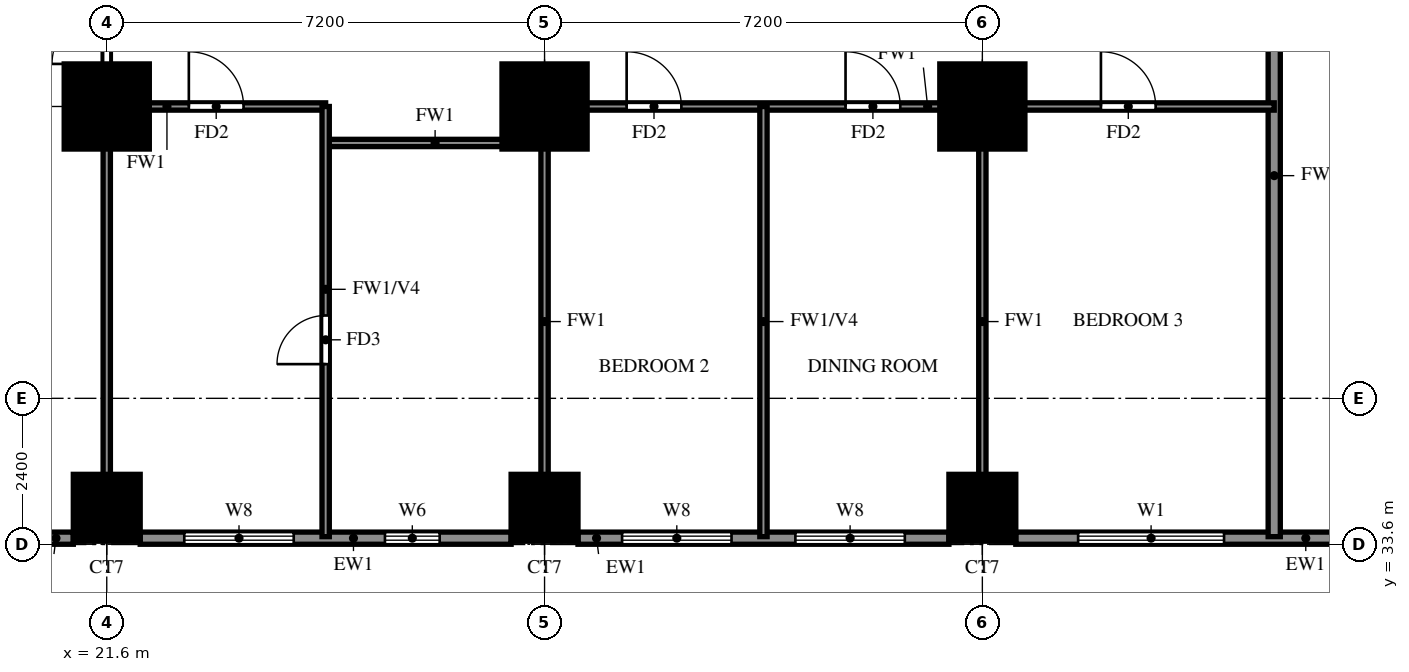
"""IFC4 building model, lengths in metres.
Left out: names, types, materials, properties, quantities, classifications, styles, units other than length and angle.
Written with IfcOpenShell. Run it as: python <this file> out.ifc"""

import sys

from ifc_helpers import new_model, si_unit, direction, frame, frame_2d, origin, origin_2d, place, context, subcontext, project, spatial, rectangle, extrude, source, transform, mapped, element, fill, save


model = new_model("IFC4")
c1 = context("Model", 3, precision=1e-05, world=origin(), true_north=direction((0.0, 1.0)))
c2 = subcontext(c1, "Body", "Model", "MODEL_VIEW")
j1 = project(units=[si_unit("LENGTHUNIT", "METRE"), si_unit("PLANEANGLEUNIT", "RADIAN")], contexts=[c1])
p1 = place(None, origin())
s1 = spatial("IfcSite", under=j1, at=p1, CompositionType="ELEMENT")
p2 = place(p1, origin())
s2 = spatial("IfcBuilding", under=s1, at=p2, CompositionType="ELEMENT")
p3 = place(p2, frame((0.0, 0.0, 48.0)))
s3 = spatial("IfcBuildingStorey", under=s2, at=p3, CompositionType="ELEMENT", Elevation=48.0)
m1 = source(origin(), c2, "Body", "SweptSolid", [
    extrude(rectangle(XDim=1.1, YDim=1.1, at=origin_2d()), origin(), (0.0, 0.0, 1.0), 3.18),
])
for number, where, z_axis, x_axis in (
    (1, (21.6, 34.2, 0.0), (0.0, 0.0, 1.0), (1.0, 0.0, 0.0)),
    (2, (28.8, 34.2, 0.0), (0.0, 0.0, 1.0), (1.0, 0.0, 0.0)),
    (3, (36.0, 34.2, 0.0), (0.0, 0.0, 1.0), (1.0, 0.0, 0.0)),
):
    element("IfcColumn", number, at=place(p3, frame(where, z_axis=z_axis, x_axis=x_axis)), inside=s3, PredefinedType="COLUMN", context=c2, shape_type="MappedRepresentation", body=[
        mapped(m1, transform((0.0, 0.0, 0.0))),
    ])
m2 = source(origin(), c2, "Body", "SweptSolid", [
    extrude(rectangle(XDim=1.4, YDim=1.4, at=origin_2d()), origin(), (0.0, 0.0, 1.0), 3.18),
])
for number, where, z_axis, x_axis in (
    (4, (21.6, 40.8, 0.0), (0.0, 0.0, 1.0), (1.0, 0.0, 0.0)),
    (5, (28.8, 40.8, 0.0), (0.0, 0.0, 1.0), (1.0, 0.0, 0.0)),
    (6, (36.0, 40.8, 0.0), (0.0, 0.0, 1.0), (1.0, 0.0, 0.0)),
):
    element("IfcColumn", number, at=place(p3, frame(where, z_axis=z_axis, x_axis=x_axis)), inside=s3, PredefinedType="COLUMN", context=c2, shape_type="MappedRepresentation", body=[
        mapped(m2, transform((0.0, 0.0, 0.0))),
    ])
p4 = place(p3, frame((18.2, 33.7, 0.0), z_axis=(0.0, 0.0, 1.0), x_axis=(1.0, 0.0, 0.0)))
e7 = element("IfcWall", 7, at=p4, inside=s3, PredefinedType="SOLIDWALL", context=c2, shape_type="SweptSolid", body=[
    extrude(rectangle(XDim=2.85, YDim=0.2, at=frame_2d((1.425, 0.0))), origin(), (0.0, 0.0, 1.0), 3.18),
])
p5 = place(p4, frame((0.525, 0.0, 0.6)))
e8 = element("IfcOpeningElement", 8, at=p5, cuts=e7, PredefinedType="OPENING", context=c2, shape_type="SweptSolid", body=[
    extrude(rectangle(XDim=1.8, YDim=2.4, at=frame_2d((0.9, 1.2))), frame((0.0, 0.11, 0.0), z_axis=(0.0, -1.0, 0.0), x_axis=(1.0, 0.0, 0.0)), (0.0, 0.0, 1.0), 0.22),
])
p6 = place(p3, frame((22.15, 33.7, 0.0), z_axis=(0.0, 0.0, 1.0), x_axis=(1.0, 0.0, 0.0)))
e9 = element("IfcWall", 9, at=p6, inside=s3, PredefinedType="SOLIDWALL", context=c2, shape_type="SweptSolid", body=[
    extrude(rectangle(XDim=6.1, YDim=0.2, at=frame_2d((3.05, 0.0))), origin(), (0.0, 0.0, 1.0), 3.18),
])
p7 = place(p6, frame((0.725, 0.0, 0.6)))
e10 = element("IfcOpeningElement", 10, at=p7, cuts=e9, PredefinedType="OPENING", context=c2, shape_type="SweptSolid", body=[
    extrude(rectangle(XDim=1.8, YDim=2.4, at=frame_2d((0.9, 1.2))), frame((0.0, 0.11, 0.0), z_axis=(0.0, -1.0, 0.0), x_axis=(1.0, 0.0, 0.0)), (0.0, 0.0, 1.0), 0.22),
])
p8 = place(p6, frame((4.025, 0.0, 1.5)))
e11 = element("IfcOpeningElement", 11, at=p8, cuts=e9, PredefinedType="OPENING", context=c2, shape_type="SweptSolid", body=[
    extrude(rectangle(XDim=0.9, YDim=0.9, at=frame_2d((0.45, 0.45))), frame((0.0, 0.11, 0.0), z_axis=(0.0, -1.0, 0.0), x_axis=(1.0, 0.0, 0.0)), (0.0, 0.0, 1.0), 0.22),
])
p9 = place(p3, frame((29.35, 33.7, 0.0), z_axis=(0.0, 0.0, 1.0), x_axis=(1.0, 0.0, 0.0)))
e12 = element("IfcWall", 12, at=p9, inside=s3, PredefinedType="SOLIDWALL", context=c2, shape_type="SweptSolid", body=[
    extrude(rectangle(XDim=6.1, YDim=0.2, at=frame_2d((3.05, 0.0))), origin(), (0.0, 0.0, 1.0), 3.18),
])
p10 = place(p9, frame((0.725, 0.0, 0.6)))
e13 = element("IfcOpeningElement", 13, at=p10, cuts=e12, PredefinedType="OPENING", context=c2, shape_type="SweptSolid", body=[
    extrude(rectangle(XDim=1.8, YDim=2.4, at=frame_2d((0.9, 1.2))), frame((0.0, 0.11, 0.0), z_axis=(0.0, -1.0, 0.0), x_axis=(1.0, 0.0, 0.0)), (0.0, 0.0, 1.0), 0.22),
])
p11 = place(p9, frame((3.575, 0.0, 0.6)))
e14 = element("IfcOpeningElement", 14, at=p11, cuts=e12, PredefinedType="OPENING", context=c2, shape_type="SweptSolid", body=[
    extrude(rectangle(XDim=1.8, YDim=2.4, at=frame_2d((0.9, 1.2))), frame((0.0, 0.11, 0.0), z_axis=(0.0, -1.0, 0.0), x_axis=(1.0, 0.0, 0.0)), (0.0, 0.0, 1.0), 0.22),
])
p12 = place(p3, frame((36.55, 33.7, 0.0), z_axis=(0.0, 0.0, 1.0), x_axis=(1.0, 0.0, 0.0)))
e15 = element("IfcWall", 15, at=p12, inside=s3, PredefinedType="SOLIDWALL", context=c2, shape_type="SweptSolid", body=[
    extrude(rectangle(XDim=5.45, YDim=0.2, at=frame_2d((2.725, 0.0))), origin(), (0.0, 0.0, 1.0), 3.18),
])
p13 = place(p12, frame((1.025, 0.0, 0.6)))
e16 = element("IfcOpeningElement", 16, at=p13, cuts=e15, PredefinedType="OPENING", context=c2, shape_type="SweptSolid", body=[
    extrude(rectangle(XDim=2.4, YDim=2.4, at=frame_2d((1.2, 1.2))), frame((0.0, 0.11, 0.0), z_axis=(0.0, -1.0, 0.0), x_axis=(1.0, 0.0, 0.0)), (0.0, 0.0, 1.0), 0.22),
])
p14 = place(p3, frame((40.8, 33.725, 0.0), z_axis=(0.0, 0.0, 1.0), x_axis=(0.0, 1.0, 0.0)))
e17 = element("IfcWall", 17, at=p14, inside=s3, PredefinedType="SOLIDWALL", context=c2, shape_type="SweptSolid", body=[
    extrude(rectangle(XDim=11.875, YDim=0.2, at=frame_2d((5.938, 0.0))), origin(), (0.0, 0.0, 1.0), 2.28),
])
p15 = place(p3, frame((25.2, 40.2, 0.0), z_axis=(0.0, 0.0, 1.0), x_axis=(1.0, 0.0, 0.0)))
e18 = element("IfcWall", 18, at=p15, inside=s3, PredefinedType="PARTITIONING", context=c2, shape_type="SweptSolid", body=[
    extrude(rectangle(XDim=3.6, YDim=0.12, at=frame_2d((1.8, 0.0))), origin(), (0.0, 0.0, 1.0), 3.18),
])
p16 = place(p3, frame((21.6, 40.8, 0.0), z_axis=(0.0, 0.0, 1.0), x_axis=(1.0, 0.0, 0.0)))
e19 = element("IfcWall", 19, at=p16, inside=s3, PredefinedType="PARTITIONING", context=c2, shape_type="SweptSolid", body=[
    extrude(rectangle(XDim=3.6, YDim=0.12, at=frame_2d((1.8, 0.0))), origin(), (0.0, 0.0, 1.0), 3.18),
])
p17 = place(p16, frame((1.35, 0.0, 0.0)))
e20 = element("IfcOpeningElement", 20, at=p17, cuts=e19, PredefinedType="OPENING", context=c2, shape_type="SweptSolid", body=[
    extrude(rectangle(XDim=0.9, YDim=2.1, at=frame_2d((0.45, 1.05))), frame((0.0, 0.07, 0.0), z_axis=(0.0, -1.0, 0.0), x_axis=(1.0, 0.0, 0.0)), (0.0, 0.0, 1.0), 0.14),
])
p18 = place(p3, frame((28.8, 40.8, 0.0), z_axis=(0.0, 0.0, 1.0), x_axis=(1.0, 0.0, 0.0)))
e21 = element("IfcWall", 21, at=p18, inside=s3, PredefinedType="PARTITIONING", context=c2, shape_type="SweptSolid", body=[
    extrude(rectangle(XDim=12.0, YDim=0.12, at=frame_2d((6.0, 0.0))), origin(), (0.0, 0.0, 1.0), 3.18),
])
p19 = place(p18, frame((1.35, 0.0, 0.0)))
e22 = element("IfcOpeningElement", 22, at=p19, cuts=e21, PredefinedType="OPENING", context=c2, shape_type="SweptSolid", body=[
    extrude(rectangle(XDim=0.9, YDim=2.1, at=frame_2d((0.45, 1.05))), frame((0.0, 0.07, 0.0), z_axis=(0.0, -1.0, 0.0), x_axis=(1.0, 0.0, 0.0)), (0.0, 0.0, 1.0), 0.14),
])
p20 = place(p18, frame((4.95, 0.0, 0.0)))
e23 = element("IfcOpeningElement", 23, at=p20, cuts=e21, PredefinedType="OPENING", context=c2, shape_type="SweptSolid", body=[
    extrude(rectangle(XDim=0.9, YDim=2.1, at=frame_2d((0.45, 1.05))), frame((0.0, 0.07, 0.0), z_axis=(0.0, -1.0, 0.0), x_axis=(1.0, 0.0, 0.0)), (0.0, 0.0, 1.0), 0.14),
])
p21 = place(p18, frame((9.15, 0.0, 0.0)))
e24 = element("IfcOpeningElement", 24, at=p21, cuts=e21, PredefinedType="OPENING", context=c2, shape_type="SweptSolid", body=[
    extrude(rectangle(XDim=0.9, YDim=2.1, at=frame_2d((0.45, 1.05))), frame((0.0, 0.07, 0.0), z_axis=(0.0, -1.0, 0.0), x_axis=(1.0, 0.0, 0.0)), (0.0, 0.0, 1.0), 0.14),
])
p22 = place(p3, frame((21.6, 33.725, 0.0), z_axis=(0.0, 0.0, 1.0), x_axis=(0.0, 1.0, 0.0)))
e25 = element("IfcWall", 25, at=p22, inside=s3, PredefinedType="PARTITIONING", context=c2, shape_type="SweptSolid", body=[
    extrude(rectangle(XDim=35.875, YDim=0.12, at=frame_2d((17.938, 0.0))), origin(), (0.0, 0.0, 1.0), 3.18),
])
p23 = place(p22, frame((7.775, 0.0, 0.0)))
e26 = element("IfcOpeningElement", 26, at=p23, cuts=e25, PredefinedType="OPENING", context=c2, shape_type="SweptSolid", body=[
    extrude(rectangle(XDim=0.9, YDim=2.1, at=frame_2d((0.45, 1.05))), frame((0.0, 0.07, 0.0), z_axis=(0.0, -1.0, 0.0), x_axis=(1.0, 0.0, 0.0)), (0.0, 0.0, 1.0), 0.14),
])
p24 = place(p22, frame((15.625, 0.0, 0.0)))
e27 = element("IfcOpeningElement", 27, at=p24, cuts=e25, PredefinedType="OPENING", context=c2, shape_type="SweptSolid", body=[
    extrude(rectangle(XDim=0.9, YDim=2.1, at=frame_2d((0.45, 1.05))), frame((0.0, 0.07, 0.0), z_axis=(0.0, -1.0, 0.0), x_axis=(1.0, 0.0, 0.0)), (0.0, 0.0, 1.0), 0.14),
])
p25 = place(p22, frame((22.225, 0.0, 0.0)))
e28 = element("IfcOpeningElement", 28, at=p25, cuts=e25, PredefinedType="OPENING", context=c2, shape_type="SweptSolid", body=[
    extrude(rectangle(XDim=1.5, YDim=2.1, at=frame_2d((0.75, 1.05))), frame((0.0, 0.07, 0.0), z_axis=(0.0, -1.0, 0.0), x_axis=(1.0, 0.0, 0.0)), (0.0, 0.0, 1.0), 0.14),
])
p26 = place(p22, frame((26.425, 0.0, 0.0)))
e29 = element("IfcOpeningElement", 29, at=p26, cuts=e25, PredefinedType="OPENING", context=c2, shape_type="SweptSolid", body=[
    extrude(rectangle(XDim=0.9, YDim=2.1, at=frame_2d((0.45, 1.05))), frame((0.0, 0.07, 0.0), z_axis=(0.0, -1.0, 0.0), x_axis=(1.0, 0.0, 0.0)), (0.0, 0.0, 1.0), 0.14),
])
p27 = place(p22, frame((31.825, 0.0, 0.0)))
e30 = element("IfcOpeningElement", 30, at=p27, cuts=e25, PredefinedType="OPENING", context=c2, shape_type="SweptSolid", body=[
    extrude(rectangle(XDim=0.9, YDim=2.1, at=frame_2d((0.45, 1.05))), frame((0.0, 0.07, 0.0), z_axis=(0.0, -1.0, 0.0), x_axis=(1.0, 0.0, 0.0)), (0.0, 0.0, 1.0), 0.14),
])
p28 = place(p3, frame((25.2, 33.725, 0.0), z_axis=(0.0, 0.0, 1.0), x_axis=(0.0, 1.0, 0.0)))
e31 = element("IfcWall", 31, at=p28, inside=s3, PredefinedType="PARTITIONING", context=c2, shape_type="SweptSolid", body=[
    extrude(rectangle(XDim=7.075, YDim=0.12, at=frame_2d((3.538, 0.0))), origin(), (0.0, 0.0, 1.0), 2.28),
])
p29 = place(p28, frame((2.837, 0.0, 0.0)))
e32 = element("IfcOpeningElement", 32, at=p29, cuts=e31, PredefinedType="OPENING", context=c2, shape_type="SweptSolid", body=[
    extrude(rectangle(XDim=0.8, YDim=2.1, at=frame_2d((0.4, 1.05))), frame((0.0, 0.07, 0.0), z_axis=(0.0, -1.0, 0.0), x_axis=(1.0, 0.0, 0.0)), (0.0, 0.0, 1.0), 0.14),
])
p30 = place(p3, frame((28.8, 33.725, 0.0), z_axis=(0.0, 0.0, 1.0), x_axis=(0.0, 1.0, 0.0)))
e33 = element("IfcWall", 33, at=p30, inside=s3, PredefinedType="PARTITIONING", context=c2, shape_type="SweptSolid", body=[
    extrude(rectangle(XDim=7.075, YDim=0.12, at=frame_2d((3.538, 0.0))), origin(), (0.0, 0.0, 1.0), 3.18),
])
p31 = place(p3, frame((32.4, 33.725, 0.0), z_axis=(0.0, 0.0, 1.0), x_axis=(0.0, 1.0, 0.0)))
e34 = element("IfcWall", 34, at=p31, inside=s3, PredefinedType="PARTITIONING", context=c2, shape_type="SweptSolid", body=[
    extrude(rectangle(XDim=7.075, YDim=0.12, at=frame_2d((3.538, 0.0))), origin(), (0.0, 0.0, 1.0), 2.28),
])
p32 = place(p3, frame((36.0, 33.725, 0.0), z_axis=(0.0, 0.0, 1.0), x_axis=(0.0, 1.0, 0.0)))
e35 = element("IfcWall", 35, at=p32, inside=s3, PredefinedType="PARTITIONING", context=c2, shape_type="SweptSolid", body=[
    extrude(rectangle(XDim=7.075, YDim=0.12, at=frame_2d((3.538, 0.0))), origin(), (0.0, 0.0, 1.0), 3.18),
])
p33 = place(p7, origin())
e36 = element("IfcWindow", 36, at=p33, inside=s3, PartitioningType="DOUBLE_PANEL_VERTICAL", PredefinedType="WINDOW", context=c2, shape_type="SweptSolid", body=[
    extrude(rectangle(XDim=1.8, YDim=2.4, at=frame_2d((0.9, 1.2))), frame((0.0, 0.03, 0.0), z_axis=(0.0, -1.0, 0.0), x_axis=(1.0, 0.0, 0.0)), (0.0, 0.0, 1.0), 0.06),
])
fill(e10, e36)
p34 = place(p8, origin())
e37 = element("IfcWindow", 37, at=p34, inside=s3, PartitioningType="SINGLE_PANEL", PredefinedType="WINDOW", context=c2, shape_type="SweptSolid", body=[
    extrude(rectangle(XDim=0.9, YDim=0.9, at=frame_2d((0.45, 0.45))), frame((0.0, 0.03, 0.0), z_axis=(0.0, -1.0, 0.0), x_axis=(1.0, 0.0, 0.0)), (0.0, 0.0, 1.0), 0.06),
])
fill(e11, e37)
p35 = place(p10, origin())
e38 = element("IfcWindow", 38, at=p35, inside=s3, PartitioningType="DOUBLE_PANEL_VERTICAL", PredefinedType="WINDOW", context=c2, shape_type="SweptSolid", body=[
    extrude(rectangle(XDim=1.8, YDim=2.4, at=frame_2d((0.9, 1.2))), frame((0.0, 0.03, 0.0), z_axis=(0.0, -1.0, 0.0), x_axis=(1.0, 0.0, 0.0)), (0.0, 0.0, 1.0), 0.06),
])
fill(e13, e38)
p36 = place(p11, origin())
e39 = element("IfcWindow", 39, at=p36, inside=s3, PartitioningType="DOUBLE_PANEL_VERTICAL", PredefinedType="WINDOW", context=c2, shape_type="SweptSolid", body=[
    extrude(rectangle(XDim=1.8, YDim=2.4, at=frame_2d((0.9, 1.2))), frame((0.0, 0.03, 0.0), z_axis=(0.0, -1.0, 0.0), x_axis=(1.0, 0.0, 0.0)), (0.0, 0.0, 1.0), 0.06),
])
fill(e14, e39)
p37 = place(p13, origin())
e40 = element("IfcWindow", 40, at=p37, inside=s3, PartitioningType="DOUBLE_PANEL_VERTICAL", PredefinedType="WINDOW", context=c2, shape_type="SweptSolid", body=[
    extrude(rectangle(XDim=2.4, YDim=2.4, at=frame_2d((1.2, 1.2))), frame((0.0, 0.03, 0.0), z_axis=(0.0, -1.0, 0.0), x_axis=(1.0, 0.0, 0.0)), (0.0, 0.0, 1.0), 0.06),
])
fill(e16, e40)
p38 = place(p23, origin())
e41 = element("IfcDoor", 41, at=p38, inside=s3, OperationType="SINGLE_SWING_LEFT", PredefinedType="DOOR", context=c2, shape_type="SweptSolid", body=[
    extrude(rectangle(XDim=0.9, YDim=2.1, at=frame_2d((0.45, 1.05))), frame((0.0, 0.025, 0.0), z_axis=(0.0, -1.0, 0.0), x_axis=(1.0, 0.0, 0.0)), (0.0, 0.0, 1.0), 0.05),
])
fill(e26, e41)
p39 = place(p17, origin())
e42 = element("IfcDoor", 42, at=p39, inside=s3, OperationType="SINGLE_SWING_LEFT", PredefinedType="DOOR", context=c2, shape_type="SweptSolid", body=[
    extrude(rectangle(XDim=0.9, YDim=2.1, at=frame_2d((0.45, 1.05))), frame((0.0, 0.025, 0.0), z_axis=(0.0, -1.0, 0.0), x_axis=(1.0, 0.0, 0.0)), (0.0, 0.0, 1.0), 0.05),
])
fill(e20, e42)
p40 = place(p29, origin())
e43 = element("IfcDoor", 43, at=p40, inside=s3, OperationType="SINGLE_SWING_LEFT", PredefinedType="DOOR", context=c2, shape_type="SweptSolid", body=[
    extrude(rectangle(XDim=0.8, YDim=2.1, at=frame_2d((0.4, 1.05))), frame((0.0, 0.025, 0.0), z_axis=(0.0, -1.0, 0.0), x_axis=(1.0, 0.0, 0.0)), (0.0, 0.0, 1.0), 0.05),
])
fill(e32, e43)
p41 = place(p19, origin())
e44 = element("IfcDoor", 44, at=p41, inside=s3, OperationType="SINGLE_SWING_RIGHT", PredefinedType="DOOR", context=c2, shape_type="SweptSolid", body=[
    extrude(rectangle(XDim=0.9, YDim=2.1, at=frame_2d((0.45, 1.05))), frame((0.0, 0.025, 0.0), z_axis=(0.0, -1.0, 0.0), x_axis=(1.0, 0.0, 0.0)), (0.0, 0.0, 1.0), 0.05),
])
fill(e22, e44)
p42 = place(p20, origin())
e45 = element("IfcDoor", 45, at=p42, inside=s3, OperationType="SINGLE_SWING_LEFT", PredefinedType="DOOR", context=c2, shape_type="SweptSolid", body=[
    extrude(rectangle(XDim=0.9, YDim=2.1, at=frame_2d((0.45, 1.05))), frame((0.0, 0.025, 0.0), z_axis=(0.0, -1.0, 0.0), x_axis=(1.0, 0.0, 0.0)), (0.0, 0.0, 1.0), 0.05),
])
fill(e23, e45)
p43 = place(p21, origin())
e46 = element("IfcDoor", 46, at=p43, inside=s3, OperationType="SINGLE_SWING_LEFT", PredefinedType="DOOR", context=c2, shape_type="SweptSolid", body=[
    extrude(rectangle(XDim=0.9, YDim=2.1, at=frame_2d((0.45, 1.05))), frame((0.0, 0.025, 0.0), z_axis=(0.0, -1.0, 0.0), x_axis=(1.0, 0.0, 0.0)), (0.0, 0.0, 1.0), 0.05),
])
fill(e24, e46)
save(model, sys.argv[1])
